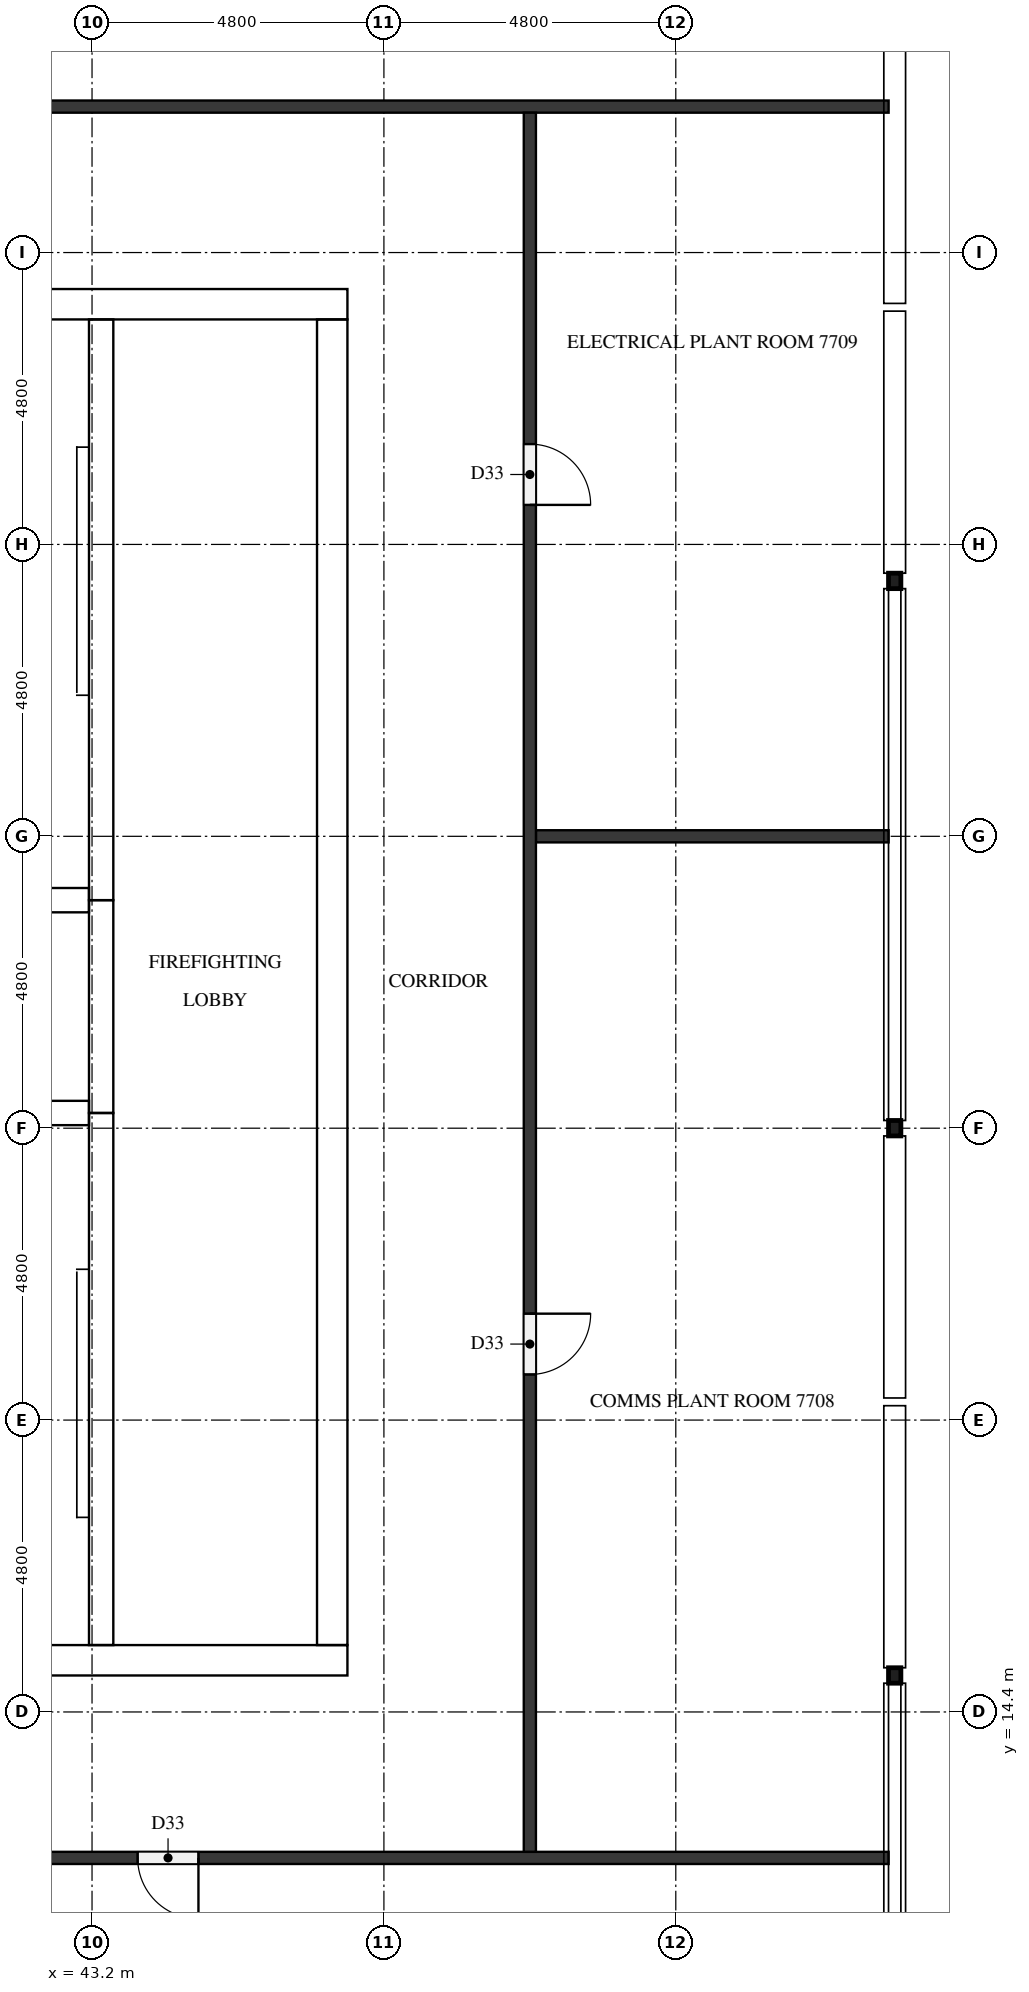
"""IFC4 building model, lengths in metres.
Left out: names, types, materials, properties, quantities, classifications, styles, units other than length and angle.
Written with IfcOpenShell. Run it as: python <this file> out.ifc"""

import sys

from ifc_helpers import new_model, si_unit, direction, frame, frame_2d, origin, origin_2d, place, context, subcontext, project, spatial, rectangle, hollow_rectangle, extrude, element, fill, save


model = new_model("IFC4")
c1 = context("Model", 3, precision=1e-05, world=origin(), true_north=direction((0.0, 1.0)))
c2 = subcontext(c1, "Body", "Model", "MODEL_VIEW")
j1 = project(units=[si_unit("LENGTHUNIT", "METRE"), si_unit("PLANEANGLEUNIT", "RADIAN")], contexts=[c1])
p1 = place(None, origin())
s1 = spatial("IfcSite", under=j1, at=p1, CompositionType="ELEMENT")
p2 = place(p1, origin())
s2 = spatial("IfcBuilding", under=s1, at=p2, CompositionType="ELEMENT")
p3 = place(p2, frame((0.0, 0.0, 296.3)))
s3 = spatial("IfcBuildingStorey", under=s2, at=p3, CompositionType="ELEMENT", Elevation=296.3)
p4 = place(p3, frame((15.0, 15.25, 0.0), z_axis=(0.0, 0.0, 1.0), x_axis=(1.0, 0.0, 0.0)))
e1 = element("IfcWall", 1, at=p4, inside=s3, PredefinedType="SHEAR", context=c2, shape_type="SweptSolid", body=[
    extrude(rectangle(XDim=32.4, YDim=0.5, at=frame_2d((16.2, 0.0))), origin(), (0.0, 0.0, 1.0), 4.4),
])
p5 = place(p4, frame((15.3, 0.0, 0.0)))
e2 = element("IfcOpeningElement", 2, at=p5, cuts=e1, PredefinedType="OPENING", context=c2, shape_type="SweptSolid", body=[
    extrude(rectangle(XDim=1.8, YDim=2.1, at=frame_2d((0.9, 1.05))), frame((0.0, 0.26, 0.0), z_axis=(0.0, -1.0, 0.0), x_axis=(1.0, 0.0, 0.0)), (0.0, 0.0, 1.0), 0.52),
])
p6 = place(p3, frame((15.0, 37.55, 0.0), z_axis=(0.0, 0.0, 1.0), x_axis=(1.0, 0.0, 0.0)))
e3 = element("IfcWall", 3, at=p6, inside=s3, PredefinedType="SHEAR", context=c2, shape_type="SweptSolid", body=[
    extrude(rectangle(XDim=32.4, YDim=0.5, at=frame_2d((16.2, 0.0))), origin(), (0.0, 0.0, 1.0), 4.4),
])
p7 = place(p6, frame((15.3, 0.0, 0.0)))
e4 = element("IfcOpeningElement", 4, at=p7, cuts=e3, PredefinedType="OPENING", context=c2, shape_type="SweptSolid", body=[
    extrude(rectangle(XDim=1.8, YDim=2.1, at=frame_2d((0.9, 1.05))), frame((0.0, 0.26, 0.0), z_axis=(0.0, -1.0, 0.0), x_axis=(1.0, 0.0, 0.0)), (0.0, 0.0, 1.0), 0.52),
])
p8 = place(p6, frame((1.282, 0.0, 0.0)))
e5 = element("IfcOpeningElement", 5, at=p8, cuts=e3, PredefinedType="OPENING", context=c2, shape_type="SweptSolid", body=[
    extrude(rectangle(XDim=1.0, YDim=2.1, at=frame_2d((0.5, 1.05))), frame((0.0, 0.26, 0.0), z_axis=(0.0, -1.0, 0.0), x_axis=(1.0, 0.0, 0.0)), (0.0, 0.0, 1.0), 0.52),
])
p9 = place(p6, frame((5.082, 0.0, 0.0)))
e6 = element("IfcOpeningElement", 6, at=p9, cuts=e3, PredefinedType="OPENING", context=c2, shape_type="SweptSolid", body=[
    extrude(rectangle(XDim=1.0, YDim=2.1, at=frame_2d((0.5, 1.05))), frame((0.0, 0.26, 0.0), z_axis=(0.0, -1.0, 0.0), x_axis=(1.0, 0.0, 0.0)), (0.0, 0.0, 1.0), 0.52),
])
p10 = place(p3, frame((47.15, 15.5, 0.0), z_axis=(0.0, 0.0, 1.0), x_axis=(0.0, 1.0, 0.0)))
e7 = element("IfcWall", 7, at=p10, inside=s3, PredefinedType="SHEAR", context=c2, shape_type="SweptSolid", body=[
    extrude(rectangle(XDim=21.8, YDim=0.5, at=frame_2d((10.9, 0.0))), origin(), (0.0, 0.0, 1.0), 4.4),
])
p11 = place(p10, frame((10.6, 0.0, 0.0)))
e8 = element("IfcOpeningElement", 8, at=p11, cuts=e7, PredefinedType="OPENING", context=c2, shape_type="SweptSolid", body=[
    extrude(rectangle(XDim=1.2, YDim=2.1, at=frame_2d((0.6, 1.05))), frame((0.0, 0.26, 0.0), z_axis=(0.0, -1.0, 0.0), x_axis=(1.0, 0.0, 0.0)), (0.0, 0.0, 1.0), 0.52),
])
p12 = place(p3, frame((43.35, 15.5, 0.0), z_axis=(0.0, 0.0, 1.0), x_axis=(0.0, 1.0, 0.0)))
e9 = element("IfcWall", 9, at=p12, inside=s3, PredefinedType="SHEAR", context=c2, shape_type="SweptSolid", body=[
    extrude(rectangle(XDim=8.75, YDim=0.4, at=frame_2d((4.375, 0.0))), origin(), (0.0, 0.0, 1.0), 4.4),
])
p13 = place(p12, frame((0.7, 0.0, 0.0)))
e10 = element("IfcOpeningElement", 10, at=p13, cuts=e9, PredefinedType="OPENING", context=c2, shape_type="SweptSolid", body=[
    extrude(rectangle(XDim=1.2, YDim=2.1, at=frame_2d((0.6, 1.05))), frame((0.0, 0.21, 0.0), z_axis=(0.0, -1.0, 0.0), x_axis=(1.0, 0.0, 0.0)), (0.0, 0.0, 1.0), 0.42),
])
p14 = place(p3, frame((43.35, 24.25, 0.0), z_axis=(0.0, 0.0, 1.0), x_axis=(0.0, 1.0, 0.0)))
e11 = element("IfcWall", 11, at=p14, inside=s3, PredefinedType="SHEAR", context=c2, shape_type="SweptSolid", body=[
    extrude(rectangle(XDim=3.5, YDim=0.4, at=frame_2d((1.75, 0.0))), origin(), (0.0, 0.0, 1.0), 4.4),
])
p15 = place(p14, frame((1.2, 0.0, 0.0)))
e12 = element("IfcOpeningElement", 12, at=p15, cuts=e11, PredefinedType="OPENING", context=c2, shape_type="SweptSolid", body=[
    extrude(rectangle(XDim=1.1, YDim=2.1, at=frame_2d((0.55, 1.05))), frame((0.0, 0.21, 0.0), z_axis=(0.0, -1.0, 0.0), x_axis=(1.0, 0.0, 0.0)), (0.0, 0.0, 1.0), 0.42),
])
p16 = place(p3, frame((43.35, 27.75, 0.0), z_axis=(0.0, 0.0, 1.0), x_axis=(0.0, 1.0, 0.0)))
e13 = element("IfcWall", 13, at=p16, inside=s3, PredefinedType="SHEAR", context=c2, shape_type="SweptSolid", body=[
    extrude(rectangle(XDim=9.55, YDim=0.4, at=frame_2d((4.775, 0.0))), origin(), (0.0, 0.0, 1.0), 4.4),
])
p17 = place(p16, frame((7.65, 0.0, 0.0)))
e14 = element("IfcOpeningElement", 14, at=p17, cuts=e13, PredefinedType="OPENING", context=c2, shape_type="SweptSolid", body=[
    extrude(rectangle(XDim=1.2, YDim=2.1, at=frame_2d((0.6, 1.05))), frame((0.0, 0.21, 0.0), z_axis=(0.0, -1.0, 0.0), x_axis=(1.0, 0.0, 0.0)), (0.0, 0.0, 1.0), 0.42),
])
for number, where, z_axis, x_axis in (
    (15, (39.5, 24.25, 0.0), (0.0, 0.0, 1.0), (1.0, 0.0, 0.0)),
    (16, (39.5, 27.75, 0.0), (0.0, 0.0, 1.0), (1.0, 0.0, 0.0)),
):
    element("IfcWall", number, at=place(p3, frame(where, z_axis=z_axis, x_axis=x_axis)), inside=s3, PredefinedType="SHEAR", context=c2, shape_type="SweptSolid", body=[
        extrude(rectangle(XDim=3.65, YDim=0.4, at=frame_2d((1.825, 0.0))), origin(), (0.0, 0.0, 1.0), 4.4),
    ])
for number, where, z_axis, x_axis in (
    (17, (56.4, 15.0, 0.0), (0.0, 0.0, 1.0), (1.0, 0.0, 0.0)),
    (18, (56.4, 24.0, 0.0), (0.0, 0.0, 1.0), (1.0, 0.0, 0.0)),
    (19, (56.4, 33.0, 0.0), (0.0, 0.0, 1.0), (1.0, 0.0, 0.0)),
):
    element("IfcColumn", number, at=place(p3, frame(where, z_axis=z_axis, x_axis=x_axis)), inside=s3, PredefinedType="COLUMN", context=c2, shape_type="SweptSolid", body=[
        extrude(hollow_rectangle(XDim=0.203, YDim=0.254, WallThickness=0.01, InnerFilletRadius=0.004, OuterFilletRadius=0.013, at=origin_2d()), origin(), (0.0, 0.0, 1.0), 4.4),
    ])
p18 = place(p3, frame((56.3, 12.0, 0.0), z_axis=(0.0, 0.0, 1.0), x_axis=(-1.0, 0.0, 0.0)))
e20 = element("IfcWall", 20, at=p18, inside=s3, PredefinedType="PARTITIONING", context=c2, shape_type="SweptSolid", body=[
    extrude(rectangle(XDim=55.0, YDim=0.2, at=frame_2d((27.5, 0.0))), origin(), (0.0, 0.0, 1.0), 4.4),
])
p19 = place(p18, frame((40.15, 0.0, 0.0)))
e21 = element("IfcOpeningElement", 21, at=p19, cuts=e20, PredefinedType="OPENING", context=c2, shape_type="SweptSolid", body=[
    extrude(rectangle(XDim=1.0, YDim=2.1, at=frame_2d((0.5, 1.05))), frame((0.0, 0.11, 0.0), z_axis=(0.0, -1.0, 0.0), x_axis=(1.0, 0.0, 0.0)), (0.0, 0.0, 1.0), 0.22),
])
p20 = place(p18, frame((26.95, 0.0, 0.0)))
e22 = element("IfcOpeningElement", 22, at=p20, cuts=e20, PredefinedType="OPENING", context=c2, shape_type="SweptSolid", body=[
    extrude(rectangle(XDim=1.0, YDim=2.1, at=frame_2d((0.5, 1.05))), frame((0.0, 0.11, 0.0), z_axis=(0.0, -1.0, 0.0), x_axis=(1.0, 0.0, 0.0)), (0.0, 0.0, 1.0), 0.22),
])
p21 = place(p18, frame((11.35, 0.0, 0.0)))
e23 = element("IfcOpeningElement", 23, at=p21, cuts=e20, PredefinedType="OPENING", context=c2, shape_type="SweptSolid", body=[
    extrude(rectangle(XDim=1.0, YDim=2.1, at=frame_2d((0.5, 1.05))), frame((0.0, 0.11, 0.0), z_axis=(0.0, -1.0, 0.0), x_axis=(1.0, 0.0, 0.0)), (0.0, 0.0, 1.0), 0.22),
])
p22 = place(p3, frame((50.5, 28.8, 0.0), z_axis=(0.0, 0.0, 1.0), x_axis=(1.0, 0.0, 0.0)))
e24 = element("IfcWall", 24, at=p22, inside=s3, PredefinedType="PARTITIONING", context=c2, shape_type="SweptSolid", body=[
    extrude(rectangle(XDim=5.8, YDim=0.2, at=frame_2d((2.9, 0.0))), origin(), (0.0, 0.0, 1.0), 4.4),
])
p23 = place(p3, frame((1.3, 40.8, 0.0), z_axis=(0.0, 0.0, 1.0), x_axis=(1.0, 0.0, 0.0)))
e25 = element("IfcWall", 25, at=p23, inside=s3, PredefinedType="PARTITIONING", context=c2, shape_type="SweptSolid", body=[
    extrude(rectangle(XDim=55.0, YDim=0.2, at=frame_2d((27.5, 0.0))), origin(), (0.0, 0.0, 1.0), 4.4),
])
p24 = place(p23, frame((16.15, 0.0, 0.0)))
e26 = element("IfcOpeningElement", 26, at=p24, cuts=e25, PredefinedType="OPENING", context=c2, shape_type="SweptSolid", body=[
    extrude(rectangle(XDim=1.0, YDim=2.1, at=frame_2d((0.5, 1.05))), frame((0.0, 0.11, 0.0), z_axis=(0.0, -1.0, 0.0), x_axis=(1.0, 0.0, 0.0)), (0.0, 0.0, 1.0), 0.22),
])
p25 = place(p23, frame((35.35, 0.0, 0.0)))
e27 = element("IfcOpeningElement", 27, at=p25, cuts=e25, PredefinedType="OPENING", context=c2, shape_type="SweptSolid", body=[
    extrude(rectangle(XDim=1.0, YDim=2.1, at=frame_2d((0.5, 1.05))), frame((0.0, 0.11, 0.0), z_axis=(0.0, -1.0, 0.0), x_axis=(1.0, 0.0, 0.0)), (0.0, 0.0, 1.0), 0.22),
])
p26 = place(p3, frame((50.4, 40.7, 0.0), z_axis=(0.0, 0.0, 1.0), x_axis=(0.0, -1.0, 0.0)))
e28 = element("IfcWall", 28, at=p26, inside=s3, PredefinedType="PARTITIONING", context=c2, shape_type="SweptSolid", body=[
    extrude(rectangle(XDim=28.6, YDim=0.2, at=frame_2d((14.3, 0.0))), origin(), (0.0, 0.0, 1.0), 4.4),
])
p27 = place(p26, frame((19.75, 0.0, 0.0)))
e29 = element("IfcOpeningElement", 29, at=p27, cuts=e28, PredefinedType="OPENING", context=c2, shape_type="SweptSolid", body=[
    extrude(rectangle(XDim=1.0, YDim=2.1, at=frame_2d((0.5, 1.05))), frame((0.0, 0.11, 0.0), z_axis=(0.0, -1.0, 0.0), x_axis=(1.0, 0.0, 0.0)), (0.0, 0.0, 1.0), 0.22),
])
p28 = place(p26, frame((5.45, 0.0, 0.0)))
e30 = element("IfcOpeningElement", 30, at=p28, cuts=e28, PredefinedType="OPENING", context=c2, shape_type="SweptSolid", body=[
    extrude(rectangle(XDim=1.0, YDim=2.1, at=frame_2d((0.5, 1.05))), frame((0.0, 0.11, 0.0), z_axis=(0.0, -1.0, 0.0), x_axis=(1.0, 0.0, 0.0)), (0.0, 0.0, 1.0), 0.22),
])
p29 = place(p15, origin())
e31 = element("IfcDoor", 31, at=p29, inside=s3, OperationType="DOUBLE_DOOR_SLIDING", PredefinedType="DOOR", context=c2, shape_type="SweptSolid", body=[
    extrude(rectangle(XDim=1.1, YDim=2.1, at=frame_2d((0.55, 1.05))), frame((0.0, 0.025, 0.0), z_axis=(0.0, -1.0, 0.0), x_axis=(1.0, 0.0, 0.0)), (0.0, 0.0, 1.0), 0.05),
])
fill(e12, e31)
p30 = place(p13, origin())
e32 = element("IfcDoor", 32, at=p30, inside=s3, OperationType="SINGLE_SWING_RIGHT", PredefinedType="DOOR", context=c2, shape_type="SweptSolid", body=[
    extrude(rectangle(XDim=1.2, YDim=2.1, at=frame_2d((0.6, 1.05))), frame((0.0, 0.025, 0.0), z_axis=(0.0, -1.0, 0.0), x_axis=(1.0, 0.0, 0.0)), (0.0, 0.0, 1.0), 0.05),
])
fill(e10, e32)
p31 = place(p17, origin())
e33 = element("IfcDoor", 33, at=p31, inside=s3, OperationType="SINGLE_SWING_LEFT", PredefinedType="DOOR", context=c2, shape_type="SweptSolid", body=[
    extrude(rectangle(XDim=1.2, YDim=2.1, at=frame_2d((0.6, 1.05))), frame((0.0, 0.025, 0.0), z_axis=(0.0, -1.0, 0.0), x_axis=(1.0, 0.0, 0.0)), (0.0, 0.0, 1.0), 0.05),
])
fill(e14, e33)
p32 = place(p11, origin())
e34 = element("IfcDoor", 34, at=p32, inside=s3, OperationType="SINGLE_SWING_LEFT", PredefinedType="DOOR", context=c2, shape_type="SweptSolid", body=[
    extrude(rectangle(XDim=1.2, YDim=2.1, at=frame_2d((0.6, 1.05))), frame((0.0, 0.025, 0.0), z_axis=(0.0, -1.0, 0.0), x_axis=(1.0, 0.0, 0.0)), (0.0, 0.0, 1.0), 0.05),
])
fill(e8, e34)
p33 = place(p21, origin())
e35 = element("IfcDoor", 35, at=p33, inside=s3, OperationType="SINGLE_SWING_LEFT", PredefinedType="DOOR", context=c2, shape_type="SweptSolid", body=[
    extrude(rectangle(XDim=1.0, YDim=2.1, at=frame_2d((0.5, 1.05))), frame((0.0, 0.025, 0.0), z_axis=(0.0, -1.0, 0.0), x_axis=(1.0, 0.0, 0.0)), (0.0, 0.0, 1.0), 0.05),
])
fill(e23, e35)
p34 = place(p27, origin())
e36 = element("IfcDoor", 36, at=p34, inside=s3, OperationType="SINGLE_SWING_LEFT", PredefinedType="DOOR", context=c2, shape_type="SweptSolid", body=[
    extrude(rectangle(XDim=1.0, YDim=2.1, at=frame_2d((0.5, 1.05))), frame((0.0, 0.025, 0.0), z_axis=(0.0, -1.0, 0.0), x_axis=(1.0, 0.0, 0.0)), (0.0, 0.0, 1.0), 0.05),
])
fill(e29, e36)
p35 = place(p28, origin())
e37 = element("IfcDoor", 37, at=p35, inside=s3, OperationType="SINGLE_SWING_RIGHT", PredefinedType="DOOR", context=c2, shape_type="SweptSolid", body=[
    extrude(rectangle(XDim=1.0, YDim=2.1, at=frame_2d((0.5, 1.05))), frame((0.0, 0.025, 0.0), z_axis=(0.0, -1.0, 0.0), x_axis=(1.0, 0.0, 0.0)), (0.0, 0.0, 1.0), 0.05),
])
fill(e30, e37)
save(model, sys.argv[1])
